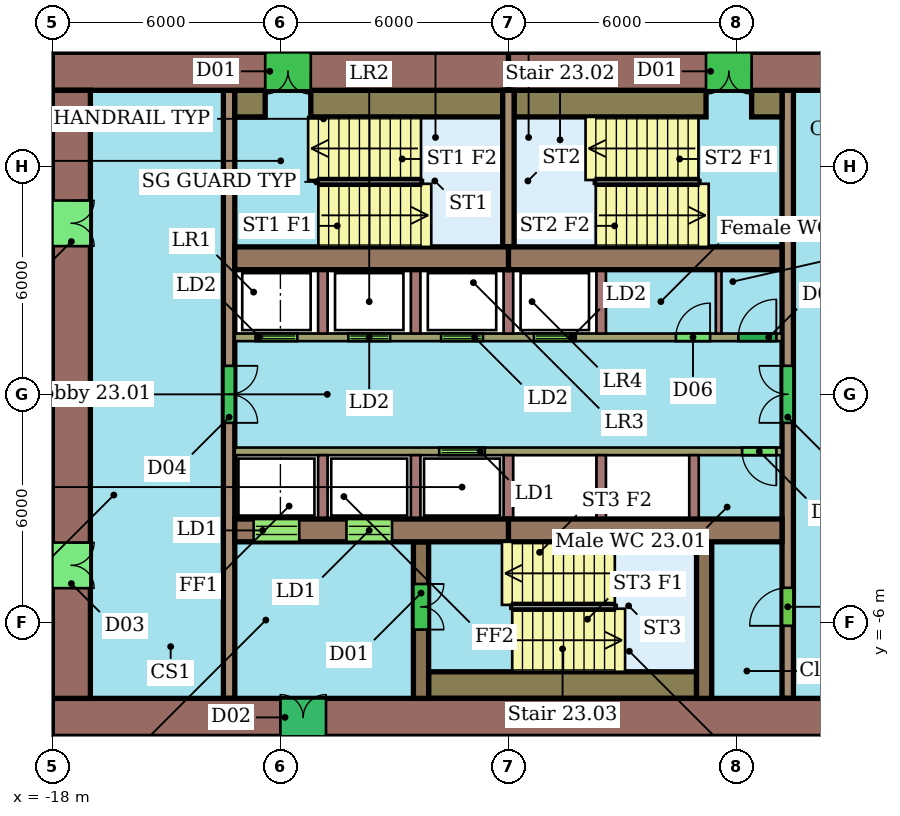
"""IFC4 building model, lengths in metres.
Left out: names, types, materials, properties, quantities, classifications, styles, units other than length and angle.
Written with IfcOpenShell. Run it as: python <this file> out.ifc"""

import sys

from ifc_helpers import new_model, si_unit, direction, frame, frame_2d, origin, place, context, subcontext, project, spatial, rectangle, extrude, element, fill, save


model = new_model("IFC4")
c1 = context("Model", 3, precision=1e-05, world=origin(), true_north=direction((0.0, 1.0)))
c2 = subcontext(c1, "Body", "Model", "MODEL_VIEW")
j1 = project(units=[si_unit("LENGTHUNIT", "METRE"), si_unit("PLANEANGLEUNIT", "RADIAN")], contexts=[c1])
p1 = place(None, origin())
s1 = spatial("IfcSite", under=j1, at=p1, CompositionType="ELEMENT")
p2 = place(p1, origin())
s2 = spatial("IfcBuilding", under=s1, at=p2, CompositionType="ELEMENT")
p3 = place(p2, frame((0.0, 0.0, 103.0)))
s3 = spatial("IfcBuildingStorey", under=s2, at=p3, CompositionType="ELEMENT", Elevation=103.0)
p4 = place(p3, frame((6.0, 8.5, 0.0), z_axis=(0.0, 0.0, 1.0), x_axis=(-1.0, 0.0, 0.0)))
e1 = element("IfcWall", 1, at=p4, inside=s3, PredefinedType="SHEAR", context=c2, shape_type="SweptSolid", body=[
    extrude(rectangle(XDim=12.0, YDim=1.0, at=frame_2d((6.0, 0.0))), origin(), (0.0, 0.0, 1.0), 3.3),
])
p5 = place(p4, frame((5.6, 0.0, 0.0)))
e2 = element("IfcOpeningElement", 2, at=p5, cuts=e1, PredefinedType="OPENING", context=c2, shape_type="SweptSolid", body=[
    extrude(rectangle(XDim=1.2, YDim=2.1, at=frame_2d((0.6, 1.05))), frame((0.0, 0.51, 0.0), z_axis=(0.0, -1.0, 0.0), x_axis=(1.0, 0.0, 0.0)), (0.0, 0.0, 1.0), 1.02),
])
p6 = place(p3, frame((-6.0, 8.5, 0.0), z_axis=(0.0, 0.0, 1.0), x_axis=(-1.0, 0.0, 0.0)))
e3 = element("IfcWall", 3, at=p6, inside=s3, PredefinedType="SHEAR", context=c2, shape_type="SweptSolid", body=[
    extrude(rectangle(XDim=12.0, YDim=1.0, at=frame_2d((6.0, 0.0))), origin(), (0.0, 0.0, 1.0), 3.3),
])
p7 = place(p6, frame((5.2, 0.0, 0.0)))
e4 = element("IfcOpeningElement", 4, at=p7, cuts=e3, PredefinedType="OPENING", context=c2, shape_type="SweptSolid", body=[
    extrude(rectangle(XDim=1.2, YDim=2.1, at=frame_2d((0.6, 1.05))), frame((0.0, 0.51, 0.0), z_axis=(0.0, -1.0, 0.0), x_axis=(1.0, 0.0, 0.0)), (0.0, 0.0, 1.0), 1.02),
])
p8 = place(p3, frame((-18.0, -8.5, 0.0), z_axis=(0.0, 0.0, 1.0), x_axis=(1.0, 0.0, 0.0)))
e5 = element("IfcWall", 5, at=p8, inside=s3, PredefinedType="SHEAR", context=c2, shape_type="SweptSolid", body=[
    extrude(rectangle(XDim=24.0, YDim=1.0, at=frame_2d((12.0, 0.0))), origin(), (0.0, 0.0, 1.0), 3.3),
])
p9 = place(p8, frame((6.0, 0.0, 0.0)))
e6 = element("IfcOpeningElement", 6, at=p9, cuts=e5, PredefinedType="OPENING", context=c2, shape_type="SweptSolid", body=[
    extrude(rectangle(XDim=1.2, YDim=2.1, at=frame_2d((0.6, 1.05))), frame((0.0, 0.51, 0.0), z_axis=(0.0, -1.0, 0.0), x_axis=(1.0, 0.0, 0.0)), (0.0, 0.0, 1.0), 1.02),
])
p10 = place(p3, frame((-17.5, 8.0, 0.0), z_axis=(0.0, 0.0, 1.0), x_axis=(0.0, -1.0, 0.0)))
e7 = element("IfcWall", 7, at=p10, inside=s3, PredefinedType="SHEAR", context=c2, shape_type="SweptSolid", body=[
    extrude(rectangle(XDim=16.0, YDim=1.0, at=frame_2d((8.0, 0.0))), origin(), (0.0, 0.0, 1.0), 3.3),
])
p11 = place(p10, frame((11.9, 0.0, 0.0)))
e8 = element("IfcOpeningElement", 8, at=p11, cuts=e7, PredefinedType="OPENING", context=c2, shape_type="SweptSolid", body=[
    extrude(rectangle(XDim=1.2, YDim=2.1, at=frame_2d((0.6, 1.05))), frame((0.0, 0.51, 0.0), z_axis=(0.0, -1.0, 0.0), x_axis=(1.0, 0.0, 0.0)), (0.0, 0.0, 1.0), 1.02),
])
p12 = place(p10, frame((2.9, 0.0, 0.0)))
e9 = element("IfcOpeningElement", 9, at=p12, cuts=e7, PredefinedType="OPENING", context=c2, shape_type="SweptSolid", body=[
    extrude(rectangle(XDim=1.2, YDim=2.1, at=frame_2d((0.6, 1.05))), frame((0.0, 0.51, 0.0), z_axis=(0.0, -1.0, 0.0), x_axis=(1.0, 0.0, 0.0)), (0.0, 0.0, 1.0), 1.02),
])
for number, where, z_axis, x_axis in (
    (10, (-13.2, 3.58, 0.0), (0.0, 0.0, 1.0), (1.0, 0.0, 0.0)),
    (11, (-6.0, 3.58, 0.0), (0.0, 0.0, 1.0), (1.0, 0.0, 0.0)),
):
    element("IfcWall", number, at=place(p3, frame(where, z_axis=z_axis, x_axis=x_axis)), inside=s3, PredefinedType="SHEAR", context=c2, shape_type="SweptSolid", body=[
        extrude(rectangle(XDim=7.2, YDim=0.6, at=frame_2d((3.6, 0.0))), origin(), (0.0, 0.0, 1.0), 3.3),
    ])
p13 = place(p3, frame((-13.2, -3.58, 0.0), z_axis=(0.0, 0.0, 1.0), x_axis=(1.0, 0.0, 0.0)))
e12 = element("IfcWall", 12, at=p13, inside=s3, PredefinedType="SHEAR", context=c2, shape_type="SweptSolid", body=[
    extrude(rectangle(XDim=7.2, YDim=0.6, at=frame_2d((3.6, 0.0))), origin(), (0.0, 0.0, 1.0), 3.3),
])
p14 = place(p13, frame((0.496, 0.0, 0.0)))
e13 = element("IfcOpeningElement", 13, at=p14, cuts=e12, PredefinedType="OPENING", context=c2, shape_type="SweptSolid", body=[
    extrude(rectangle(XDim=1.2, YDim=2.1, at=frame_2d((0.6, 1.05))), frame((0.0, 0.31, 0.0), z_axis=(0.0, -1.0, 0.0), x_axis=(1.0, 0.0, 0.0)), (0.0, 0.0, 1.0), 0.62),
])
p15 = place(p13, frame((2.938, 0.0, 0.0)))
e14 = element("IfcOpeningElement", 14, at=p15, cuts=e12, PredefinedType="OPENING", context=c2, shape_type="SweptSolid", body=[
    extrude(rectangle(XDim=1.2, YDim=2.1, at=frame_2d((0.6, 1.05))), frame((0.0, 0.31, 0.0), z_axis=(0.0, -1.0, 0.0), x_axis=(1.0, 0.0, 0.0)), (0.0, 0.0, 1.0), 0.62),
])
p16 = place(p3, frame((-6.0, -3.58, 0.0), z_axis=(0.0, 0.0, 1.0), x_axis=(1.0, 0.0, 0.0)))
e15 = element("IfcWall", 15, at=p16, inside=s3, PredefinedType="SHEAR", context=c2, shape_type="SweptSolid", body=[
    extrude(rectangle(XDim=7.2, YDim=0.6, at=frame_2d((3.6, 0.0))), origin(), (0.0, 0.0, 1.0), 3.3),
])
p17 = place(p3, frame((-13.35, 8.0, 0.0), z_axis=(0.0, 0.0, 1.0), x_axis=(0.0, -1.0, 0.0)))
e16 = element("IfcWall", 16, at=p17, inside=s3, PredefinedType="SHEAR", context=c2, shape_type="SweptSolid", body=[
    extrude(rectangle(XDim=16.0, YDim=0.3, at=frame_2d((8.0, 0.0))), origin(), (0.0, 0.0, 1.0), 3.3),
])
p18 = place(p17, frame((7.25, 0.0, 0.0)))
e17 = element("IfcOpeningElement", 17, at=p18, cuts=e16, PredefinedType="OPENING", context=c2, shape_type="SweptSolid", body=[
    extrude(rectangle(XDim=1.5, YDim=2.1, at=frame_2d((0.75, 1.05))), frame((0.0, 0.16, 0.0), z_axis=(0.0, -1.0, 0.0), x_axis=(1.0, 0.0, 0.0)), (0.0, 0.0, 1.0), 0.32),
])
p19 = place(p3, frame((1.35, -8.0, 0.0), z_axis=(0.0, 0.0, 1.0), x_axis=(0.0, 1.0, 0.0)))
e18 = element("IfcWall", 18, at=p19, inside=s3, PredefinedType="SHEAR", context=c2, shape_type="SweptSolid", body=[
    extrude(rectangle(XDim=16.0, YDim=0.3, at=frame_2d((8.0, 0.0))), origin(), (0.0, 0.0, 1.0), 3.3),
])
p20 = place(p19, frame((1.91, 0.0, 0.0)))
e19 = element("IfcOpeningElement", 19, at=p20, cuts=e18, PredefinedType="OPENING", context=c2, shape_type="SweptSolid", body=[
    extrude(rectangle(XDim=1.0, YDim=2.1, at=frame_2d((0.5, 1.05))), frame((0.0, 0.16, 0.0), z_axis=(0.0, -1.0, 0.0), x_axis=(1.0, 0.0, 0.0)), (0.0, 0.0, 1.0), 0.32),
])
p21 = place(p19, frame((7.25, 0.0, 0.0)))
e20 = element("IfcOpeningElement", 20, at=p21, cuts=e18, PredefinedType="OPENING", context=c2, shape_type="SweptSolid", body=[
    extrude(rectangle(XDim=1.5, YDim=2.1, at=frame_2d((0.75, 1.05))), frame((0.0, 0.16, 0.0), z_axis=(0.0, -1.0, 0.0), x_axis=(1.0, 0.0, 0.0)), (0.0, 0.0, 1.0), 0.32),
])
p22 = place(p3, frame((-13.2, 1.5, 0.0), z_axis=(0.0, 0.0, 1.0), x_axis=(1.0, 0.0, 0.0)))
e21 = element("IfcWall", 21, at=p22, inside=s3, PredefinedType="SHEAR", context=c2, shape_type="SweptSolid", body=[
    extrude(rectangle(XDim=14.4, YDim=0.2, at=frame_2d((7.2, 0.0))), origin(), (0.0, 0.0, 1.0), 3.3),
])
p23 = place(p22, frame((0.546, 0.0, 0.0)))
e22 = element("IfcOpeningElement", 22, at=p23, cuts=e21, PredefinedType="OPENING", context=c2, shape_type="SweptSolid", body=[
    extrude(rectangle(XDim=1.1, YDim=2.1, at=frame_2d((0.55, 1.05))), frame((0.0, 0.11, 0.0), z_axis=(0.0, -1.0, 0.0), x_axis=(1.0, 0.0, 0.0)), (0.0, 0.0, 1.0), 0.22),
])
p24 = place(p22, frame((2.988, 0.0, 0.0)))
e23 = element("IfcOpeningElement", 23, at=p24, cuts=e21, PredefinedType="OPENING", context=c2, shape_type="SweptSolid", body=[
    extrude(rectangle(XDim=1.1, YDim=2.1, at=frame_2d((0.55, 1.05))), frame((0.0, 0.11, 0.0), z_axis=(0.0, -1.0, 0.0), x_axis=(1.0, 0.0, 0.0)), (0.0, 0.0, 1.0), 0.22),
])
p25 = place(p22, frame((5.429, 0.0, 0.0)))
e24 = element("IfcOpeningElement", 24, at=p25, cuts=e21, PredefinedType="OPENING", context=c2, shape_type="SweptSolid", body=[
    extrude(rectangle(XDim=1.1, YDim=2.1, at=frame_2d((0.55, 1.05))), frame((0.0, 0.11, 0.0), z_axis=(0.0, -1.0, 0.0), x_axis=(1.0, 0.0, 0.0)), (0.0, 0.0, 1.0), 0.22),
])
p26 = place(p22, frame((7.871, 0.0, 0.0)))
e25 = element("IfcOpeningElement", 25, at=p26, cuts=e21, PredefinedType="OPENING", context=c2, shape_type="SweptSolid", body=[
    extrude(rectangle(XDim=1.1, YDim=2.1, at=frame_2d((0.55, 1.05))), frame((0.0, 0.11, 0.0), z_axis=(0.0, -1.0, 0.0), x_axis=(1.0, 0.0, 0.0)), (0.0, 0.0, 1.0), 0.22),
])
p27 = place(p22, frame((11.607, 0.0, 0.0)))
e26 = element("IfcOpeningElement", 26, at=p27, cuts=e21, PredefinedType="OPENING", context=c2, shape_type="SweptSolid", body=[
    extrude(rectangle(XDim=0.9, YDim=2.1, at=frame_2d((0.45, 1.05))), frame((0.0, 0.11, 0.0), z_axis=(0.0, -1.0, 0.0), x_axis=(1.0, 0.0, 0.0)), (0.0, 0.0, 1.0), 0.22),
])
p28 = place(p22, frame((13.25, 0.0, 0.0)))
e27 = element("IfcOpeningElement", 27, at=p28, cuts=e21, PredefinedType="OPENING", context=c2, shape_type="SweptSolid", body=[
    extrude(rectangle(XDim=1.0, YDim=2.1, at=frame_2d((0.5, 1.05))), frame((0.0, 0.11, 0.0), z_axis=(0.0, -1.0, 0.0), x_axis=(1.0, 0.0, 0.0)), (0.0, 0.0, 1.0), 0.22),
])
p29 = place(p3, frame((1.2, -1.5, 0.0), z_axis=(0.0, 0.0, 1.0), x_axis=(-1.0, 0.0, 0.0)))
e28 = element("IfcWall", 28, at=p29, inside=s3, PredefinedType="SHEAR", context=c2, shape_type="SweptSolid", body=[
    extrude(rectangle(XDim=14.4, YDim=0.2, at=frame_2d((7.2, 0.0))), origin(), (0.0, 0.0, 1.0), 3.3),
])
p30 = place(p29, frame((7.821, 0.0, 0.0)))
e29 = element("IfcOpeningElement", 29, at=p30, cuts=e28, PredefinedType="OPENING", context=c2, shape_type="SweptSolid", body=[
    extrude(rectangle(XDim=1.2, YDim=2.1, at=frame_2d((0.6, 1.05))), frame((0.0, 0.11, 0.0), z_axis=(0.0, -1.0, 0.0), x_axis=(1.0, 0.0, 0.0)), (0.0, 0.0, 1.0), 0.22),
])
p31 = place(p29, frame((0.15, 0.0, 0.0)))
e30 = element("IfcOpeningElement", 30, at=p31, cuts=e28, PredefinedType="OPENING", context=c2, shape_type="SweptSolid", body=[
    extrude(rectangle(XDim=0.9, YDim=2.1, at=frame_2d((0.45, 1.05))), frame((0.0, 0.11, 0.0), z_axis=(0.0, -1.0, 0.0), x_axis=(1.0, 0.0, 0.0)), (0.0, 0.0, 1.0), 0.22),
])
p32 = place(p3, frame((-8.3, -3.88, 0.0), z_axis=(0.0, 0.0, 1.0), x_axis=(0.0, -1.0, 0.0)))
e31 = element("IfcWall", 31, at=p32, inside=s3, PredefinedType="SHEAR", context=c2, shape_type="SweptSolid", body=[
    extrude(rectangle(XDim=4.12, YDim=0.4, at=frame_2d((2.06, 0.0))), origin(), (0.0, 0.0, 1.0), 3.3),
])
p33 = place(p32, frame((1.11, 0.0, 0.0)))
e32 = element("IfcOpeningElement", 32, at=p33, cuts=e31, PredefinedType="OPENING", context=c2, shape_type="SweptSolid", body=[
    extrude(rectangle(XDim=1.2, YDim=2.1, at=frame_2d((0.6, 1.05))), frame((0.0, 0.21, 0.0), z_axis=(0.0, -1.0, 0.0), x_axis=(1.0, 0.0, 0.0)), (0.0, 0.0, 1.0), 0.42),
])
p34 = place(p3, frame((-0.85, -3.88, 0.0), z_axis=(0.0, 0.0, 1.0), x_axis=(0.0, -1.0, 0.0)))
e33 = element("IfcWall", 33, at=p34, inside=s3, PredefinedType="SHEAR", context=c2, shape_type="SweptSolid", body=[
    extrude(rectangle(XDim=4.12, YDim=0.4, at=frame_2d((2.06, 0.0))), origin(), (0.0, 0.0, 1.0), 3.3),
])
p35 = place(p3, frame((-6.0, 3.88, 0.0), z_axis=(0.0, 0.0, 1.0), x_axis=(0.0, 1.0, 0.0)))
e34 = element("IfcWall", 34, at=p35, inside=s3, PredefinedType="SHEAR", context=c2, shape_type="SweptSolid", body=[
    extrude(rectangle(XDim=4.12, YDim=0.3, at=frame_2d((2.06, 0.0))), origin(), (0.0, 0.0, 1.0), 3.3),
])
p36 = place(p3, frame((-13.2, 7.65, 0.0), z_axis=(0.0, 0.0, 1.0), x_axis=(1.0, 0.0, 0.0)))
e35 = element("IfcWall", 35, at=p36, inside=s3, PredefinedType="SHEAR", context=c2, shape_type="SweptSolid", body=[
    extrude(rectangle(XDim=0.8, YDim=0.7, at=frame_2d((0.4, 0.0))), origin(), (0.0, 0.0, 1.0), 3.3),
])
for number, where, z_axis, x_axis in (
    (36, (-11.2, 7.65, 0.0), (0.0, 0.0, 1.0), (1.0, 0.0, 0.0)),
    (37, (-5.85, 7.65, 0.0), (0.0, 0.0, 1.0), (1.0, 0.0, 0.0)),
):
    element("IfcWall", number, at=place(p3, frame(where, z_axis=z_axis, x_axis=x_axis)), inside=s3, PredefinedType="SHEAR", context=c2, shape_type="SweptSolid", body=[
        extrude(rectangle(XDim=5.05, YDim=0.7, at=frame_2d((2.525, 0.0))), origin(), (0.0, 0.0, 1.0), 3.3),
    ])
p37 = place(p3, frame((0.4, 7.65, 0.0), z_axis=(0.0, 0.0, 1.0), x_axis=(1.0, 0.0, 0.0)))
e38 = element("IfcWall", 38, at=p37, inside=s3, PredefinedType="SHEAR", context=c2, shape_type="SweptSolid", body=[
    extrude(rectangle(XDim=0.8, YDim=0.7, at=frame_2d((0.4, 0.0))), origin(), (0.0, 0.0, 1.0), 3.3),
])
p38 = place(p3, frame((-8.1, -7.65, 0.0), z_axis=(0.0, 0.0, 1.0), x_axis=(1.0, 0.0, 0.0)))
e39 = element("IfcWall", 39, at=p38, inside=s3, PredefinedType="SHEAR", context=c2, shape_type="SweptSolid", body=[
    extrude(rectangle(XDim=7.05, YDim=0.7, at=frame_2d((3.525, 0.0))), origin(), (0.0, 0.0, 1.0), 3.3),
])
for number, where, z_axis, x_axis in (
    (40, (-10.883, 1.6, 0.0), (0.0, 0.0, 1.0), (0.0, 1.0, 0.0)),
    (41, (-8.442, 1.6, 0.0), (0.0, 0.0, 1.0), (0.0, 1.0, 0.0)),
    (42, (-6.0, 1.6, 0.0), (0.0, 0.0, 1.0), (0.0, 1.0, 0.0)),
    (43, (-3.558, 1.6, 0.0), (0.0, 0.0, 1.0), (0.0, 1.0, 0.0)),
):
    element("IfcWall", number, at=place(p3, frame(where, z_axis=z_axis, x_axis=x_axis)), inside=s3, PredefinedType="SHEAR", context=c2, shape_type="SweptSolid", body=[
        extrude(rectangle(XDim=1.68, YDim=0.25, at=frame_2d((0.84, 0.0))), origin(), (0.0, 0.0, 1.0), 3.3),
    ])
p39 = place(p3, frame((-0.468, 1.6, 0.0), z_axis=(0.0, 0.0, 1.0), x_axis=(0.0, 1.0, 0.0)))
e44 = element("IfcWall", 44, at=p39, inside=s3, PredefinedType="PARTITIONING", context=c2, shape_type="SweptSolid", body=[
    extrude(rectangle(XDim=1.68, YDim=0.15, at=frame_2d((0.84, 0.0))), origin(), (0.0, 0.0, 1.0), 3.3),
])
for number, where, z_axis, x_axis in (
    (45, (-10.883, -1.6, 0.0), (0.0, 0.0, 1.0), (0.0, -1.0, 0.0)),
    (46, (-8.442, -1.6, 0.0), (0.0, 0.0, 1.0), (0.0, -1.0, 0.0)),
    (47, (-6.0, -1.6, 0.0), (0.0, 0.0, 1.0), (0.0, -1.0, 0.0)),
    (48, (-3.558, -1.6, 0.0), (0.0, 0.0, 1.0), (0.0, -1.0, 0.0)),
    (49, (-1.117, -1.6, 0.0), (0.0, 0.0, 1.0), (0.0, -1.0, 0.0)),
):
    element("IfcWall", number, at=place(p3, frame(where, z_axis=z_axis, x_axis=x_axis)), inside=s3, PredefinedType="SHEAR", context=c2, shape_type="SweptSolid", body=[
        extrude(rectangle(XDim=1.68, YDim=0.25, at=frame_2d((0.84, 0.0))), origin(), (0.0, 0.0, 1.0), 3.3),
    ])
p40 = place(p5, origin())
e50 = element("IfcDoor", 50, at=p40, inside=s3, OperationType="DOUBLE_DOOR_SINGLE_SWING", PredefinedType="NOTDEFINED", context=c2, shape_type="SweptSolid", body=[
    extrude(rectangle(XDim=1.2, YDim=2.1, at=frame_2d((0.6, 1.05))), frame((0.0, 0.025, 0.0), z_axis=(0.0, -1.0, 0.0), x_axis=(1.0, 0.0, 0.0)), (0.0, 0.0, 1.0), 0.05),
])
fill(e2, e50)
p41 = place(p7, origin())
e51 = element("IfcDoor", 51, at=p41, inside=s3, OperationType="DOUBLE_DOOR_SINGLE_SWING", PredefinedType="NOTDEFINED", context=c2, shape_type="SweptSolid", body=[
    extrude(rectangle(XDim=1.2, YDim=2.1, at=frame_2d((0.6, 1.05))), frame((0.0, 0.025, 0.0), z_axis=(0.0, -1.0, 0.0), x_axis=(1.0, 0.0, 0.0)), (0.0, 0.0, 1.0), 0.05),
])
fill(e4, e51)
p42 = place(p9, origin())
e52 = element("IfcDoor", 52, at=p42, inside=s3, OperationType="DOUBLE_DOOR_SINGLE_SWING", PredefinedType="NOTDEFINED", context=c2, shape_type="SweptSolid", body=[
    extrude(rectangle(XDim=1.2, YDim=2.1, at=frame_2d((0.6, 1.05))), frame((0.0, 0.025, 0.0), z_axis=(0.0, -1.0, 0.0), x_axis=(1.0, 0.0, 0.0)), (0.0, 0.0, 1.0), 0.05),
])
fill(e6, e52)
p43 = place(p11, origin())
e53 = element("IfcDoor", 53, at=p43, inside=s3, OperationType="DOUBLE_DOOR_SINGLE_SWING", PredefinedType="NOTDEFINED", context=c2, shape_type="SweptSolid", body=[
    extrude(rectangle(XDim=1.2, YDim=2.1, at=frame_2d((0.6, 1.05))), frame((0.0, 0.025, 0.0), z_axis=(0.0, -1.0, 0.0), x_axis=(1.0, 0.0, 0.0)), (0.0, 0.0, 1.0), 0.05),
])
fill(e8, e53)
p44 = place(p12, origin())
e54 = element("IfcDoor", 54, at=p44, inside=s3, OperationType="DOUBLE_DOOR_SINGLE_SWING", PredefinedType="NOTDEFINED", context=c2, shape_type="SweptSolid", body=[
    extrude(rectangle(XDim=1.2, YDim=2.1, at=frame_2d((0.6, 1.05))), frame((0.0, 0.025, 0.0), z_axis=(0.0, -1.0, 0.0), x_axis=(1.0, 0.0, 0.0)), (0.0, 0.0, 1.0), 0.05),
])
fill(e9, e54)
p45 = place(p14, origin())
e55 = element("IfcDoor", 55, at=p45, inside=s3, OperationType="DOUBLE_DOOR_SLIDING", PredefinedType="NOTDEFINED", context=c2, shape_type="SweptSolid", body=[
    extrude(rectangle(XDim=1.2, YDim=2.1, at=frame_2d((0.6, 1.05))), frame((0.0, 0.025, 0.0), z_axis=(0.0, -1.0, 0.0), x_axis=(1.0, 0.0, 0.0)), (0.0, 0.0, 1.0), 0.05),
])
fill(e13, e55)
p46 = place(p15, origin())
e56 = element("IfcDoor", 56, at=p46, inside=s3, OperationType="DOUBLE_DOOR_SLIDING", PredefinedType="NOTDEFINED", context=c2, shape_type="SweptSolid", body=[
    extrude(rectangle(XDim=1.2, YDim=2.1, at=frame_2d((0.6, 1.05))), frame((0.0, 0.025, 0.0), z_axis=(0.0, -1.0, 0.0), x_axis=(1.0, 0.0, 0.0)), (0.0, 0.0, 1.0), 0.05),
])
fill(e14, e56)
p47 = place(p18, origin())
e57 = element("IfcDoor", 57, at=p47, inside=s3, OperationType="DOUBLE_DOOR_SINGLE_SWING", PredefinedType="NOTDEFINED", context=c2, shape_type="SweptSolid", body=[
    extrude(rectangle(XDim=1.5, YDim=2.1, at=frame_2d((0.75, 1.05))), frame((0.0, 0.025, 0.0), z_axis=(0.0, -1.0, 0.0), x_axis=(1.0, 0.0, 0.0)), (0.0, 0.0, 1.0), 0.05),
])
fill(e17, e57)
p48 = place(p20, origin())
e58 = element("IfcDoor", 58, at=p48, inside=s3, OperationType="SINGLE_SWING_LEFT", PredefinedType="NOTDEFINED", context=c2, shape_type="SweptSolid", body=[
    extrude(rectangle(XDim=1.0, YDim=2.1, at=frame_2d((0.5, 1.05))), frame((0.0, 0.025, 0.0), z_axis=(0.0, -1.0, 0.0), x_axis=(1.0, 0.0, 0.0)), (0.0, 0.0, 1.0), 0.05),
])
fill(e19, e58)
p49 = place(p21, origin())
e59 = element("IfcDoor", 59, at=p49, inside=s3, OperationType="DOUBLE_DOOR_SINGLE_SWING", PredefinedType="NOTDEFINED", context=c2, shape_type="SweptSolid", body=[
    extrude(rectangle(XDim=1.5, YDim=2.1, at=frame_2d((0.75, 1.05))), frame((0.0, 0.025, 0.0), z_axis=(0.0, -1.0, 0.0), x_axis=(1.0, 0.0, 0.0)), (0.0, 0.0, 1.0), 0.05),
])
fill(e20, e59)
p50 = place(p23, origin())
e60 = element("IfcDoor", 60, at=p50, inside=s3, OperationType="DOUBLE_DOOR_SLIDING", PredefinedType="NOTDEFINED", context=c2, shape_type="SweptSolid", body=[
    extrude(rectangle(XDim=1.1, YDim=2.1, at=frame_2d((0.55, 1.05))), frame((0.0, 0.025, 0.0), z_axis=(0.0, -1.0, 0.0), x_axis=(1.0, 0.0, 0.0)), (0.0, 0.0, 1.0), 0.05),
])
fill(e22, e60)
p51 = place(p24, origin())
e61 = element("IfcDoor", 61, at=p51, inside=s3, OperationType="DOUBLE_DOOR_SLIDING", PredefinedType="NOTDEFINED", context=c2, shape_type="SweptSolid", body=[
    extrude(rectangle(XDim=1.1, YDim=2.1, at=frame_2d((0.55, 1.05))), frame((0.0, 0.025, 0.0), z_axis=(0.0, -1.0, 0.0), x_axis=(1.0, 0.0, 0.0)), (0.0, 0.0, 1.0), 0.05),
])
fill(e23, e61)
p52 = place(p25, origin())
e62 = element("IfcDoor", 62, at=p52, inside=s3, OperationType="DOUBLE_DOOR_SLIDING", PredefinedType="NOTDEFINED", context=c2, shape_type="SweptSolid", body=[
    extrude(rectangle(XDim=1.1, YDim=2.1, at=frame_2d((0.55, 1.05))), frame((0.0, 0.025, 0.0), z_axis=(0.0, -1.0, 0.0), x_axis=(1.0, 0.0, 0.0)), (0.0, 0.0, 1.0), 0.05),
])
fill(e24, e62)
p53 = place(p26, origin())
e63 = element("IfcDoor", 63, at=p53, inside=s3, OperationType="DOUBLE_DOOR_SLIDING", PredefinedType="NOTDEFINED", context=c2, shape_type="SweptSolid", body=[
    extrude(rectangle(XDim=1.1, YDim=2.1, at=frame_2d((0.55, 1.05))), frame((0.0, 0.025, 0.0), z_axis=(0.0, -1.0, 0.0), x_axis=(1.0, 0.0, 0.0)), (0.0, 0.0, 1.0), 0.05),
])
fill(e25, e63)
p54 = place(p27, origin())
e64 = element("IfcDoor", 64, at=p54, inside=s3, OperationType="SINGLE_SWING_RIGHT", PredefinedType="NOTDEFINED", context=c2, shape_type="SweptSolid", body=[
    extrude(rectangle(XDim=0.9, YDim=2.1, at=frame_2d((0.45, 1.05))), frame((0.0, 0.025, 0.0), z_axis=(0.0, -1.0, 0.0), x_axis=(1.0, 0.0, 0.0)), (0.0, 0.0, 1.0), 0.05),
])
fill(e26, e64)
p55 = place(p28, origin())
e65 = element("IfcDoor", 65, at=p55, inside=s3, OperationType="SINGLE_SWING_RIGHT", PredefinedType="NOTDEFINED", context=c2, shape_type="SweptSolid", body=[
    extrude(rectangle(XDim=1.0, YDim=2.1, at=frame_2d((0.5, 1.05))), frame((0.0, 0.025, 0.0), z_axis=(0.0, -1.0, 0.0), x_axis=(1.0, 0.0, 0.0)), (0.0, 0.0, 1.0), 0.05),
])
fill(e27, e65)
p56 = place(p30, origin())
e66 = element("IfcDoor", 66, at=p56, inside=s3, OperationType="DOUBLE_DOOR_SLIDING", PredefinedType="NOTDEFINED", context=c2, shape_type="SweptSolid", body=[
    extrude(rectangle(XDim=1.2, YDim=2.1, at=frame_2d((0.6, 1.05))), frame((0.0, 0.025, 0.0), z_axis=(0.0, -1.0, 0.0), x_axis=(1.0, 0.0, 0.0)), (0.0, 0.0, 1.0), 0.05),
])
fill(e29, e66)
p57 = place(p31, origin())
e67 = element("IfcDoor", 67, at=p57, inside=s3, OperationType="SINGLE_SWING_LEFT", PredefinedType="NOTDEFINED", context=c2, shape_type="SweptSolid", body=[
    extrude(rectangle(XDim=0.9, YDim=2.1, at=frame_2d((0.45, 1.05))), frame((0.0, 0.025, 0.0), z_axis=(0.0, -1.0, 0.0), x_axis=(1.0, 0.0, 0.0)), (0.0, 0.0, 1.0), 0.05),
])
fill(e30, e67)
p58 = place(p33, origin())
e68 = element("IfcDoor", 68, at=p58, inside=s3, OperationType="DOUBLE_DOOR_SINGLE_SWING", PredefinedType="NOTDEFINED", context=c2, shape_type="SweptSolid", body=[
    extrude(rectangle(XDim=1.2, YDim=2.1, at=frame_2d((0.6, 1.05))), frame((0.0, 0.025, 0.0), z_axis=(0.0, -1.0, 0.0), x_axis=(1.0, 0.0, 0.0)), (0.0, 0.0, 1.0), 0.05),
])
fill(e32, e68)
save(model, sys.argv[1])
